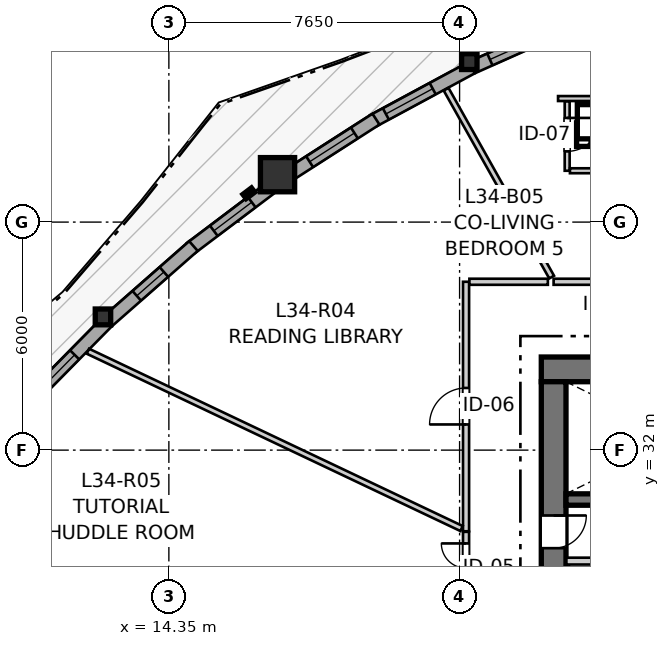
"""IFC4 building model, lengths in metres.
Left out: names, types, materials, properties, quantities, classifications, styles, units other than length and angle.
Written with IfcOpenShell. Run it as: python <this file> out.ifc"""

import sys

from ifc_helpers import new_model, si_unit, direction, frame, frame_2d, origin, origin_2d, place, context, subcontext, project, spatial, rectangle, i_section, extrude, source, transform, mapped, element, fill, save


model = new_model("IFC4")
c1 = context("Model", 3, precision=1e-05, world=origin(), true_north=direction((0.0, 1.0)))
c2 = subcontext(c1, "Body", "Model", "MODEL_VIEW")
j1 = project(units=[si_unit("LENGTHUNIT", "METRE"), si_unit("PLANEANGLEUNIT", "RADIAN")], contexts=[c1])
p1 = place(None, origin())
s1 = spatial("IfcSite", under=j1, at=p1, CompositionType="ELEMENT")
p2 = place(p1, origin())
s2 = spatial("IfcBuilding", under=s1, at=p2, CompositionType="ELEMENT")
p3 = place(p2, frame((0.0, 0.0, 115.2)))
s3 = spatial("IfcBuildingStorey", under=s2, at=p3, CompositionType="ELEMENT", Elevation=115.2)
p4 = place(p3, frame((36.55, 34.125, 0.0), z_axis=(0.0, 0.0, 1.0), x_axis=(-1.0, 0.0, 0.0)))
e1 = element("IfcWall", 1, at=p4, inside=s3, PredefinedType="SHEAR", context=c2, shape_type="SweptSolid", body=[
    extrude(rectangle(XDim=12.4, YDim=0.65, at=frame_2d((6.2, 0.0))), origin(), (0.0, 0.0, 1.0), 2.95),
])
p5 = place(p3, frame((24.475, 33.8, 0.0), z_axis=(0.0, 0.0, 1.0), x_axis=(0.0, -1.0, 0.0)))
e2 = element("IfcWall", 2, at=p5, inside=s3, PredefinedType="SHEAR", context=c2, shape_type="SweptSolid", body=[
    extrude(rectangle(XDim=15.6, YDim=0.65, at=frame_2d((7.8, 0.0))), origin(), (0.0, 0.0, 1.0), 2.95),
])
p6 = place(p5, frame((7.05, 0.0, 0.0)))
e3 = element("IfcOpeningElement", 3, at=p6, cuts=e2, PredefinedType="OPENING", context=c2, shape_type="SweptSolid", body=[
    extrude(rectangle(XDim=1.5, YDim=2.15, at=frame_2d((0.75, 1.075))), frame((0.0, 0.335, 0.0), z_axis=(0.0, -1.0, 0.0), x_axis=(1.0, 0.0, 0.0)), (0.0, 0.0, 1.0), 0.67),
])
p7 = place(p5, frame((3.52, 0.0, 0.0)))
e4 = element("IfcOpeningElement", 4, at=p7, cuts=e2, PredefinedType="OPENING", context=c2, shape_type="SweptSolid", body=[
    extrude(rectangle(XDim=0.86, YDim=2.05, at=frame_2d((0.43, 1.025))), frame((0.0, 0.335, 0.0), z_axis=(0.0, -1.0, 0.0), x_axis=(1.0, 0.0, 0.0)), (0.0, 0.0, 1.0), 0.67),
])
p8 = place(p5, frame((11.22, 0.0, 0.0)))
e5 = element("IfcOpeningElement", 5, at=p8, cuts=e2, PredefinedType="OPENING", context=c2, shape_type="SweptSolid", body=[
    extrude(rectangle(XDim=0.86, YDim=2.05, at=frame_2d((0.43, 1.025))), frame((0.0, 0.335, 0.0), z_axis=(0.0, -1.0, 0.0), x_axis=(1.0, 0.0, 0.0)), (0.0, 0.0, 1.0), 0.67),
])
p9 = place(p3, frame((24.8, 30.7, 0.0), z_axis=(0.0, 0.0, 1.0), x_axis=(1.0, 0.0, 0.0)))
e6 = element("IfcWall", 6, at=p9, inside=s3, PredefinedType="SHEAR", context=c2, shape_type="SweptSolid", body=[
    extrude(rectangle(XDim=11.1, YDim=0.3, at=frame_2d((5.55, 0.0))), origin(), (0.0, 0.0, 1.0), 2.95),
])
p10 = place(p9, frame((6.22, 0.0, 0.0)))
e7 = element("IfcOpeningElement", 7, at=p10, cuts=e6, PredefinedType="OPENING", context=c2, shape_type="SweptSolid", body=[
    extrude(rectangle(XDim=0.98, YDim=2.15, at=frame_2d((0.49, 1.075))), frame((0.0, 0.16, 0.0), z_axis=(0.0, -1.0, 0.0), x_axis=(1.0, 0.0, 0.0)), (0.0, 0.0, 1.0), 0.32),
])
p11 = place(p9, frame((9.15, 0.0, 0.0)))
e8 = element("IfcOpeningElement", 8, at=p11, cuts=e6, PredefinedType="OPENING", context=c2, shape_type="SweptSolid", body=[
    extrude(rectangle(XDim=1.15, YDim=2.15, at=frame_2d((0.575, 1.075))), frame((0.0, 0.16, 0.0), z_axis=(0.0, -1.0, 0.0), x_axis=(1.0, 0.0, 0.0)), (0.0, 0.0, 1.0), 0.32),
])
m1 = source(origin(), c2, "Body", "SweptSolid", [
    extrude(i_section(OverallWidth=0.406, OverallDepth=0.416, WebThickness=0.027, FlangeThickness=0.044, FilletRadius=0.015, at=origin_2d()), origin(), (0.0, 0.0, 1.0), 2.95),
])
p12 = place(p3, frame((22.256, 42.222, 0.0), z_axis=(0.0, 0.0, 1.0), x_axis=(1.0, 0.0, 0.0)))
e9 = element("IfcColumn", 9, at=p12, inside=s3, PredefinedType="PILASTER", context=c2, shape_type="MappedRepresentation", body=[
    mapped(m1, transform((0.0, 0.0, 0.0), x_axis=(1.0, 0.0, 0.0), y_axis=(0.0, 1.0, 0.0), z_axis=(0.0, 0.0, 1.0), scale=1.0)),
])
m2 = source(origin(), c2, "Body", "SweptSolid", [
    extrude(rectangle(XDim=0.9, YDim=0.9, at=origin_2d()), origin(), (0.0, 0.0, 1.0), 2.95),
])
p13 = place(p3, frame((17.209, 39.247, 0.0), z_axis=(0.0, 0.0, 1.0), x_axis=(1.0, 0.0, 0.0)))
e10 = element("IfcColumn", 10, at=p13, inside=s3, PredefinedType="COLUMN", context=c2, shape_type="MappedRepresentation", body=[
    mapped(m2, transform((0.0, 0.0, 0.0), x_axis=(1.0, 0.0, 0.0), y_axis=(0.0, 1.0, 0.0), z_axis=(0.0, 0.0, 1.0), scale=1.0)),
])
p14 = place(p3, frame((12.616, 35.505, 0.0), z_axis=(0.0, 0.0, 1.0), x_axis=(1.0, 0.0, 0.0)))
e11 = element("IfcColumn", 11, at=p14, inside=s3, PredefinedType="PILASTER", context=c2, shape_type="MappedRepresentation", body=[
    mapped(m1, transform((0.0, 0.0, 0.0), x_axis=(1.0, 0.0, 0.0), y_axis=(0.0, 1.0, 0.0), z_axis=(0.0, 0.0, 1.0), scale=1.0)),
])
p15 = place(p3, frame((25.052, 43.283, 0.0), z_axis=(0.0, 0.0, 1.0), x_axis=(-0.913400340023, -0.407062426227, 0.0)))
e12 = element("IfcWall", 12, at=p15, inside=s3, PredefinedType="SOLIDWALL", context=c2, shape_type="SweptSolid", body=[
    extrude(rectangle(XDim=2.966, YDim=0.34, at=frame_2d((1.483, 0.0))), origin(), (0.0, 0.0, 1.0), 2.48),
])
p16 = place(p15, frame((0.518, 0.0, 0.82)))
e13 = element("IfcOpeningElement", 13, at=p16, cuts=e12, PredefinedType="OPENING", context=c2, shape_type="SweptSolid", body=[
    extrude(rectangle(XDim=1.95, YDim=1.4, at=frame_2d((0.975, 0.7))), frame((0.0, 0.18, 0.0), z_axis=(0.0, -1.0, 0.0), x_axis=(1.0, 0.0, 0.0)), (0.0, 0.0, 1.0), 0.36),
])
p17 = place(p3, frame((22.319, 42.063, 0.0), z_axis=(0.0, 0.0, 1.0), x_axis=(-0.880050731383, -0.4748796797, 0.0)))
e14 = element("IfcWall", 14, at=p17, inside=s3, PredefinedType="SOLIDWALL", context=c2, shape_type="SweptSolid", body=[
    extrude(rectangle(XDim=2.949, YDim=0.34, at=frame_2d((1.475, 0.0))), origin(), (0.0, 0.0, 1.0), 2.48),
])
p18 = place(p17, frame((1.166, 0.0, 0.82)))
e15 = element("IfcOpeningElement", 15, at=p18, cuts=e14, PredefinedType="OPENING", context=c2, shape_type="SweptSolid", body=[
    extrude(rectangle(XDim=1.4, YDim=1.35, at=frame_2d((0.7, 0.675))), frame((0.0, 0.18, 0.0), z_axis=(0.0, -1.0, 0.0), x_axis=(1.0, 0.0, 0.0)), (0.0, 0.0, 1.0), 0.36),
])
p19 = place(p3, frame((19.8, 40.708, 0.0), z_axis=(0.0, 0.0, 1.0), x_axis=(-0.841470838401, -0.540302533883, 0.0)))
e16 = element("IfcWall", 16, at=p19, inside=s3, PredefinedType="SOLIDWALL", context=c2, shape_type="SweptSolid", body=[
    extrude(rectangle(XDim=2.739, YDim=0.34, at=frame_2d((1.37, 0.0))), origin(), (0.0, 0.0, 1.0), 2.48),
])
p20 = place(p19, frame((0.675, 0.0, 0.82)))
e17 = element("IfcOpeningElement", 17, at=p20, cuts=e16, PredefinedType="OPENING", context=c2, shape_type="SweptSolid", body=[
    extrude(rectangle(XDim=1.4, YDim=1.35, at=frame_2d((0.7, 0.675))), frame((0.0, 0.18, 0.0), z_axis=(0.0, -1.0, 0.0), x_axis=(1.0, 0.0, 0.0)), (0.0, 0.0, 1.0), 0.36),
])
p21 = place(p3, frame((17.128, 38.973, 0.0), z_axis=(0.0, 0.0, 1.0), x_axis=(-0.798381200707, -0.602152354772, 0.0)))
e18 = element("IfcWall", 18, at=p21, inside=s3, PredefinedType="SOLIDWALL", context=c2, shape_type="SweptSolid", body=[
    extrude(rectangle(XDim=2.756, YDim=0.34, at=frame_2d((1.378, 0.0))), origin(), (0.0, 0.0, 1.0), 2.48),
])
p22 = place(p21, frame((0.748, 0.0, 0.82)))
e19 = element("IfcOpeningElement", 19, at=p22, cuts=e18, PredefinedType="OPENING", context=c2, shape_type="SweptSolid", body=[
    extrude(rectangle(XDim=1.25, YDim=1.35, at=frame_2d((0.625, 0.675))), frame((0.0, 0.18, 0.0), z_axis=(0.0, -1.0, 0.0), x_axis=(1.0, 0.0, 0.0)), (0.0, 0.0, 1.0), 0.36),
])
p23 = place(p3, frame((14.997, 37.37, 0.0), z_axis=(0.0, 0.0, 1.0), x_axis=(-0.751446130796, -0.659794447166, 0.0)))
e20 = element("IfcWall", 20, at=p23, inside=s3, PredefinedType="SOLIDWALL", context=c2, shape_type="SweptSolid", body=[
    extrude(rectangle(XDim=3.0, YDim=0.34, at=frame_2d((1.5, 0.0))), origin(), (0.0, 0.0, 1.0), 2.48),
])
p24 = place(p23, frame((1.035, 0.0, 0.82)))
e21 = element("IfcOpeningElement", 21, at=p24, cuts=e20, PredefinedType="OPENING", context=c2, shape_type="SweptSolid", body=[
    extrude(rectangle(XDim=0.95, YDim=1.35, at=frame_2d((0.475, 0.675))), frame((0.0, 0.18, 0.0), z_axis=(0.0, -1.0, 0.0), x_axis=(1.0, 0.0, 0.0)), (0.0, 0.0, 1.0), 0.36),
])
p25 = place(p3, frame((12.723, 35.372, 0.0), z_axis=(0.0, 0.0, 1.0), x_axis=(-0.701922597509, -0.71225323243, 0.0)))
e22 = element("IfcWall", 22, at=p25, inside=s3, PredefinedType="SOLIDWALL", context=c2, shape_type="SweptSolid", body=[
    extrude(rectangle(XDim=3.049, YDim=0.34, at=frame_2d((1.524, 0.0))), origin(), (0.0, 0.0, 1.0), 2.48),
])
p26 = place(p25, frame((1.214, 0.0, 0.82)))
e23 = element("IfcOpeningElement", 23, at=p26, cuts=e22, PredefinedType="OPENING", context=c2, shape_type="SweptSolid", body=[
    extrude(rectangle(XDim=1.45, YDim=1.25, at=frame_2d((0.725, 0.625))), frame((0.0, 0.18, 0.0), z_axis=(0.0, -1.0, 0.0), x_axis=(1.0, 0.0, 0.0)), (0.0, 0.0, 1.0), 0.36),
])
p27 = place(p3, frame((24.81, 29.08, 0.0), z_axis=(0.0, 0.0, 1.0), x_axis=(1.0, 0.0, 0.0)))
e24 = element("IfcWall", 24, at=p27, inside=s3, PredefinedType="PARTITIONING", context=c2, shape_type="SweptSolid", body=[
    extrude(rectangle(XDim=5.84, YDim=0.18, at=frame_2d((2.92, 0.0))), origin(), (0.0, 0.0, 1.0), 2.95),
])
p28 = place(p3, frame((22.17, 29.865, 0.0), z_axis=(0.0, 0.0, 1.0), x_axis=(0.0, 1.0, 0.0)))
e25 = element("IfcWall", 25, at=p28, inside=s3, PredefinedType="PARTITIONING", context=c2, shape_type="SweptSolid", body=[
    extrude(rectangle(XDim=6.565, YDim=0.16, at=frame_2d((3.282, 0.0))), origin(), (0.0, 0.0, 1.0), 2.95),
])
p29 = place(p28, frame((2.811, 0.0, 0.0)))
e26 = element("IfcOpeningElement", 26, at=p29, cuts=e25, PredefinedType="OPENING", context=c2, shape_type="SweptSolid", body=[
    extrude(rectangle(XDim=0.96, YDim=2.1, at=frame_2d((0.48, 1.05))), frame((0.0, 0.09, 0.0), z_axis=(0.0, -1.0, 0.0), x_axis=(1.0, 0.0, 0.0)), (0.0, 0.0, 1.0), 0.18),
])
p30 = place(p3, frame((24.474, 36.43, 0.0), z_axis=(0.0, 0.0, 1.0), x_axis=(1.0, 0.0, 0.0)))
e27 = element("IfcWall", 27, at=p30, inside=s3, PredefinedType="PARTITIONING", context=c2, shape_type="SweptSolid", body=[
    extrude(rectangle(XDim=2.914, YDim=0.16, at=frame_2d((1.457, 0.0))), origin(), (0.0, 0.0, 1.0), 2.588),
])
p31 = place(p30, frame((0.998, 0.0, 0.0)))
e28 = element("IfcOpeningElement", 28, at=p31, cuts=e27, PredefinedType="OPENING", context=c2, shape_type="SweptSolid", body=[
    extrude(rectangle(XDim=0.92, YDim=2.1, at=frame_2d((0.46, 1.05))), frame((0.0, 0.09, 0.0), z_axis=(0.0, -1.0, 0.0), x_axis=(1.0, 0.0, 0.0)), (0.0, 0.0, 1.0), 0.18),
])
p32 = place(p3, frame((22.17, 27.85, 0.0), z_axis=(0.0, 0.0, 1.0), x_axis=(0.0, 1.0, 0.0)))
e29 = element("IfcWall", 29, at=p32, inside=s3, PredefinedType="PARTITIONING", context=c2, shape_type="SweptSolid", body=[
    extrude(rectangle(XDim=2.0, YDim=0.16, at=frame_2d((1.0, 0.0))), origin(), (0.0, 0.0, 1.0), 2.95),
])
p33 = place(p32, frame((0.395, 0.0, 0.0)))
e30 = element("IfcOpeningElement", 30, at=p33, cuts=e29, PredefinedType="OPENING", context=c2, shape_type="SweptSolid", body=[
    extrude(rectangle(XDim=1.3, YDim=2.1, at=frame_2d((0.65, 1.05))), frame((0.0, 0.09, 0.0), z_axis=(0.0, -1.0, 0.0), x_axis=(1.0, 0.0, 0.0)), (0.0, 0.0, 1.0), 0.18),
])
p34 = place(p3, frame((24.831, 41.178, 0.0), z_axis=(0.0, 0.0, 1.0), x_axis=(0.0, -1.0, 0.0)))
e31 = element("IfcWall", 31, at=p34, inside=s3, PredefinedType="PARTITIONING", context=c2, shape_type="SweptSolid", body=[
    extrude(rectangle(XDim=1.827, YDim=0.13, at=frame_2d((0.914, 0.0))), origin(), (0.0, 0.0, 1.0), 2.95),
])
p35 = place(p34, frame((0.437, 0.0, 0.0)))
e32 = element("IfcOpeningElement", 32, at=p35, cuts=e31, PredefinedType="OPENING", context=c2, shape_type="SweptSolid", body=[
    extrude(rectangle(XDim=0.88, YDim=2.05, at=frame_2d((0.44, 1.025))), frame((0.0, 0.075, 0.0), z_axis=(0.0, -1.0, 0.0), x_axis=(1.0, 0.0, 0.0)), (0.0, 0.0, 1.0), 0.15),
])
p36 = place(p3, frame((12.219, 34.602, 0.0), z_axis=(0.0, 0.0, 1.0), x_axis=(0.90346129999, -0.428669662351, 0.0)))
e33 = element("IfcWall", 33, at=p36, inside=s3, PredefinedType="PARTITIONING", context=c2, shape_type="SweptSolid", body=[
    extrude(rectangle(XDim=10.883, YDim=0.145, at=frame_2d((5.441, 0.0))), origin(), (0.0, 0.0, 1.0), 2.95),
])
p37 = place(p3, frame((21.645, 41.497, 0.0), z_axis=(0.0, 0.0, 1.0), x_axis=(0.489699005063, -0.871891555436, 0.0)))
e34 = element("IfcWall", 34, at=p37, inside=s3, PredefinedType="PARTITIONING", context=c2, shape_type="SweptSolid", body=[
    extrude(rectangle(XDim=5.671, YDim=0.145, at=frame_2d((2.835, 0.0))), origin(), (0.0, 0.0, 1.0), 2.95),
])
p38 = place(p3, frame((22.258, 36.43, 0.0), z_axis=(0.0, 0.0, 1.0), x_axis=(1.0, 0.0, 0.0)))
e35 = element("IfcWall", 35, at=p38, inside=s3, PredefinedType="PARTITIONING", context=c2, shape_type="SweptSolid", body=[
    extrude(rectangle(XDim=2.065, YDim=0.16, at=frame_2d((1.032, 0.0))), origin(), (0.0, 0.0, 1.0), 2.95),
])
p39 = place(p3, frame((24.904, 39.351, 0.0), z_axis=(0.0, 0.0, 1.0), x_axis=(1.0, 0.0, 0.0)))
e36 = element("IfcWall", 36, at=p39, inside=s3, PredefinedType="PARTITIONING", context=c2, shape_type="SweptSolid", body=[
    extrude(rectangle(XDim=1.533, YDim=0.13, at=frame_2d((0.767, 0.0))), origin(), (0.0, 0.0, 1.0), 2.95),
])
p40 = place(p3, frame((25.433, 43.222, 0.0), z_axis=(0.0, 0.0, 1.0), x_axis=(0.274641170969, -0.961546788882, 0.0)))
e37 = element("IfcWall", 37, at=p40, inside=s3, PredefinedType="PARTITIONING", context=c2, shape_type="SweptSolid", body=[
    extrude(rectangle(XDim=1.21, YDim=0.145, at=frame_2d((0.605, 0.0))), origin(), (0.0, 0.0, 1.0), 2.95),
])
p41 = place(p3, frame((24.591, 41.251, 0.0), z_axis=(0.0, 0.0, 1.0), x_axis=(1.0, 0.0, 0.0)))
e38 = element("IfcWall", 38, at=p41, inside=s3, PredefinedType="PARTITIONING", context=c2, shape_type="SweptSolid", body=[
    extrude(rectangle(XDim=1.215, YDim=0.13, at=frame_2d((0.607, 0.0))), origin(), (0.0, 0.0, 1.0), 2.95),
])
m3 = source(origin(), c2, "Body", "SweptSolid", [
    extrude(rectangle(XDim=1.95, YDim=1.4, at=frame_2d((0.975, 0.7))), frame((0.0, 0.03, 0.0), z_axis=(0.0, -1.0, 0.0), x_axis=(1.0, 0.0, 0.0)), (0.0, 0.0, 1.0), 0.06),
])
p42 = place(p16, origin())
e39 = element("IfcWindow", 39, at=p42, inside=s3, PartitioningType="SINGLE_PANEL", PredefinedType="WINDOW", context=c2, shape_type="MappedRepresentation", body=[
    mapped(m3, transform((0.0, 0.0, 0.0), x_axis=(1.0, 0.0, 0.0), y_axis=(0.0, 1.0, 0.0), z_axis=(0.0, 0.0, 1.0), scale=1.0)),
])
fill(e13, e39)
m4 = source(origin(), c2, "Body", "SweptSolid", [
    extrude(rectangle(XDim=1.4, YDim=1.35, at=frame_2d((0.7, 0.675))), frame((0.0, 0.03, 0.0), z_axis=(0.0, -1.0, 0.0), x_axis=(1.0, 0.0, 0.0)), (0.0, 0.0, 1.0), 0.06),
])
p43 = place(p18, origin())
e40 = element("IfcWindow", 40, at=p43, inside=s3, PartitioningType="SINGLE_PANEL", PredefinedType="WINDOW", context=c2, shape_type="MappedRepresentation", body=[
    mapped(m4, transform((0.0, 0.0, 0.0), x_axis=(1.0, 0.0, 0.0), y_axis=(0.0, 1.0, 0.0), z_axis=(0.0, 0.0, 1.0), scale=1.0)),
])
fill(e15, e40)
p44 = place(p20, origin())
e41 = element("IfcWindow", 41, at=p44, inside=s3, PartitioningType="SINGLE_PANEL", PredefinedType="WINDOW", context=c2, shape_type="MappedRepresentation", body=[
    mapped(m4, transform((0.0, 0.0, 0.0), x_axis=(1.0, 0.0, 0.0), y_axis=(0.0, 1.0, 0.0), z_axis=(0.0, 0.0, 1.0), scale=1.0)),
])
fill(e17, e41)
m5 = source(origin(), c2, "Body", "SweptSolid", [
    extrude(rectangle(XDim=1.25, YDim=1.35, at=frame_2d((0.625, 0.675))), frame((0.0, 0.03, 0.0), z_axis=(0.0, -1.0, 0.0), x_axis=(1.0, 0.0, 0.0)), (0.0, 0.0, 1.0), 0.06),
])
p45 = place(p22, origin())
e42 = element("IfcWindow", 42, at=p45, inside=s3, PartitioningType="SINGLE_PANEL", PredefinedType="WINDOW", context=c2, shape_type="MappedRepresentation", body=[
    mapped(m5, transform((0.0, 0.0, 0.0), x_axis=(1.0, 0.0, 0.0), y_axis=(0.0, 1.0, 0.0), z_axis=(0.0, 0.0, 1.0), scale=1.0)),
])
fill(e19, e42)
m6 = source(origin(), c2, "Body", "SweptSolid", [
    extrude(rectangle(XDim=0.95, YDim=1.35, at=frame_2d((0.475, 0.675))), frame((0.0, 0.03, 0.0), z_axis=(0.0, -1.0, 0.0), x_axis=(1.0, 0.0, 0.0)), (0.0, 0.0, 1.0), 0.06),
])
p46 = place(p24, origin())
e43 = element("IfcWindow", 43, at=p46, inside=s3, PartitioningType="SINGLE_PANEL", PredefinedType="WINDOW", context=c2, shape_type="MappedRepresentation", body=[
    mapped(m6, transform((0.0, 0.0, 0.0), x_axis=(1.0, 0.0, 0.0), y_axis=(0.0, 1.0, 0.0), z_axis=(0.0, 0.0, 1.0), scale=1.0)),
])
fill(e21, e43)
m7 = source(origin(), c2, "Body", "SweptSolid", [
    extrude(rectangle(XDim=1.45, YDim=1.25, at=frame_2d((0.725, 0.625))), frame((0.0, 0.03, 0.0), z_axis=(0.0, -1.0, 0.0), x_axis=(1.0, 0.0, 0.0)), (0.0, 0.0, 1.0), 0.06),
])
p47 = place(p26, origin())
e44 = element("IfcWindow", 44, at=p47, inside=s3, PartitioningType="SINGLE_PANEL", PredefinedType="WINDOW", context=c2, shape_type="MappedRepresentation", body=[
    mapped(m7, transform((0.0, 0.0, 0.0), x_axis=(1.0, 0.0, 0.0), y_axis=(0.0, 1.0, 0.0), z_axis=(0.0, 0.0, 1.0), scale=1.0)),
])
fill(e23, e44)
m8 = source(origin(), c2, "Body", "SweptSolid", [
    extrude(rectangle(XDim=0.86, YDim=2.05, at=frame_2d((0.43, 1.025))), frame((0.0, 0.025, 0.0), z_axis=(0.0, -1.0, 0.0), x_axis=(1.0, 0.0, 0.0)), (0.0, 0.0, 1.0), 0.05),
])
p48 = place(p7, origin())
e45 = element("IfcDoor", 45, at=p48, inside=s3, OperationType="SINGLE_SWING_LEFT", PredefinedType="DOOR", context=c2, shape_type="MappedRepresentation", body=[
    mapped(m8, transform((0.0, 0.0, 0.0), x_axis=(1.0, 0.0, 0.0), y_axis=(0.0, 1.0, 0.0), z_axis=(0.0, 0.0, 1.0), scale=1.0)),
])
fill(e4, e45)
m9 = source(origin(), c2, "Body", "SweptSolid", [
    extrude(rectangle(XDim=0.96, YDim=2.1, at=frame_2d((0.48, 1.05))), frame((0.0, 0.025, 0.0), z_axis=(0.0, -1.0, 0.0), x_axis=(1.0, 0.0, 0.0)), (0.0, 0.0, 1.0), 0.05),
])
p49 = place(p29, origin())
e46 = element("IfcDoor", 46, at=p49, inside=s3, OperationType="SINGLE_SWING_LEFT", PredefinedType="DOOR", context=c2, shape_type="MappedRepresentation", body=[
    mapped(m9, transform((0.0, 0.0, 0.0), x_axis=(1.0, 0.0, 0.0), y_axis=(0.0, 1.0, 0.0), z_axis=(0.0, 0.0, 1.0), scale=1.0)),
])
fill(e26, e46)
m10 = source(origin(), c2, "Body", "SweptSolid", [
    extrude(rectangle(XDim=1.3, YDim=2.1, at=frame_2d((0.65, 1.05))), frame((0.0, 0.025, 0.0), z_axis=(0.0, -1.0, 0.0), x_axis=(1.0, 0.0, 0.0)), (0.0, 0.0, 1.0), 0.05),
])
p50 = place(p33, origin())
e47 = element("IfcDoor", 47, at=p50, inside=s3, OperationType="DOUBLE_DOOR_SINGLE_SWING", PredefinedType="DOOR", context=c2, shape_type="MappedRepresentation", body=[
    mapped(m10, transform((0.0, 0.0, 0.0), x_axis=(1.0, 0.0, 0.0), y_axis=(0.0, 1.0, 0.0), z_axis=(0.0, 0.0, 1.0), scale=1.0)),
])
fill(e30, e47)
m11 = source(origin(), c2, "Body", "SweptSolid", [
    extrude(rectangle(XDim=0.88, YDim=2.05, at=frame_2d((0.44, 1.025))), frame((0.0, 0.025, 0.0), z_axis=(0.0, -1.0, 0.0), x_axis=(1.0, 0.0, 0.0)), (0.0, 0.0, 1.0), 0.05),
])
p51 = place(p35, origin())
e48 = element("IfcDoor", 48, at=p51, inside=s3, OperationType="SINGLE_SWING_LEFT", PredefinedType="DOOR", context=c2, shape_type="MappedRepresentation", body=[
    mapped(m11, transform((0.0, 0.0, 0.0), x_axis=(1.0, 0.0, 0.0), y_axis=(0.0, 1.0, 0.0), z_axis=(0.0, 0.0, 1.0), scale=1.0)),
])
fill(e32, e48)
save(model, sys.argv[1])
